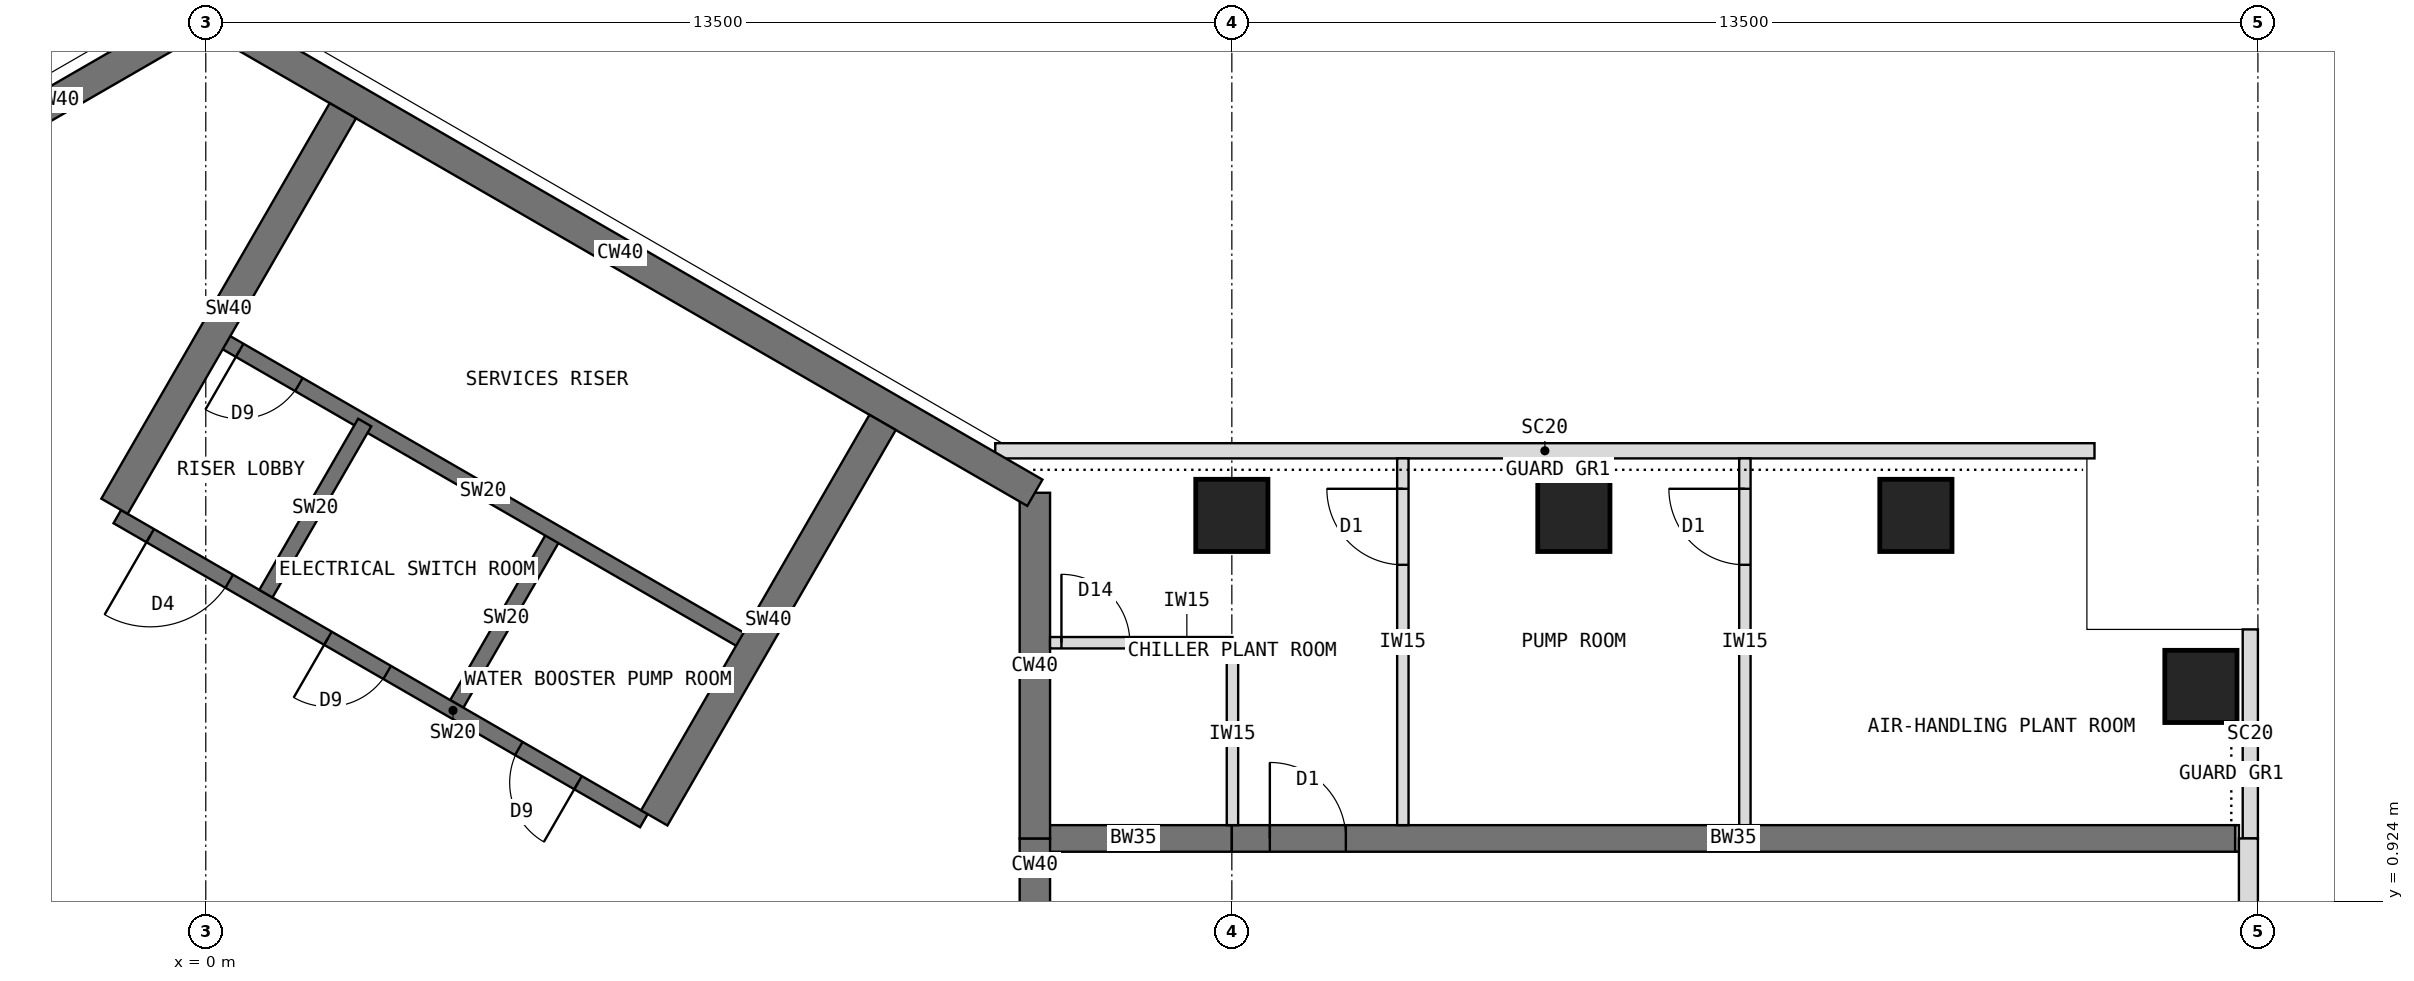
"""IFC4 building model, lengths in metres.
Left out: names, types, materials, properties, quantities, classifications, styles, units other than length and angle.
Written with IfcOpenShell. Run it as: python <this file> out.ifc"""

import sys

from ifc_helpers import new_model, si_unit, direction, frame, frame_2d, origin, origin_2d, place, context, subcontext, project, spatial, rectangle, extrude, element, fill, save


model = new_model("IFC4")
c1 = context("Model", 3, precision=1e-05, world=origin(), true_north=direction((0.0, 1.0)))
c2 = subcontext(c1, "Body", "Model", "MODEL_VIEW")
j1 = project(units=[si_unit("LENGTHUNIT", "METRE"), si_unit("PLANEANGLEUNIT", "RADIAN")], contexts=[c1])
p1 = place(None, origin())
s1 = spatial("IfcSite", under=j1, at=p1, CompositionType="ELEMENT")
p2 = place(p1, origin())
s2 = spatial("IfcBuilding", under=s1, at=p2, CompositionType="ELEMENT")
p3 = place(p2, frame((0.0, 0.0, 291.5)))
s3 = spatial("IfcBuildingStorey", under=s2, at=p3, CompositionType="ELEMENT", Elevation=291.5)
p4 = place(p3, frame((10.908, -1.75, 0.0), z_axis=(0.0, 0.0, 1.0), x_axis=(0.0, 1.0, 0.0)))
e1 = element("IfcWall", 1, at=p4, inside=s3, PredefinedType="SHEAR", context=c2, shape_type="SweptSolid", body=[
    extrude(rectangle(XDim=3.5, YDim=0.4, at=frame_2d((1.75, 0.0))), origin(), (0.0, 0.0, 1.0), 4.55),
])
p5 = place(p4, frame((0.85, 0.0, 0.0)))
e2 = element("IfcOpeningElement", 2, at=p5, cuts=e1, PredefinedType="OPENING", context=c2, shape_type="SweptSolid", body=[
    extrude(rectangle(XDim=1.8, YDim=2.1, at=frame_2d((0.9, 1.05))), frame((0.0, 0.21, 0.0), z_axis=(0.0, -1.0, 0.0), x_axis=(1.0, 0.0, 0.0)), (0.0, 0.0, 1.0), 0.42),
])
p6 = place(p3, frame((10.908, 1.75, 0.0), z_axis=(0.0, 0.0, 1.0), x_axis=(0.0, 1.0, 0.0)))
e3 = element("IfcWall", 3, at=p6, inside=s3, PredefinedType="SHEAR", context=c2, shape_type="SweptSolid", body=[
    extrude(rectangle(XDim=4.548, YDim=0.4, at=frame_2d((2.274, 0.0))), origin(), (0.0, 0.0, 1.0), 4.55),
])
p7 = place(p3, frame((10.908, 6.298, 0.0), z_axis=(0.0, 0.0, 1.0), x_axis=(-0.866021940709, 0.500005998175, 0.0)))
e4 = element("IfcWall", 4, at=p7, inside=s3, PredefinedType="SHEAR", context=c2, shape_type="SweptSolid", body=[
    extrude(rectangle(XDim=12.596, YDim=0.4, at=frame_2d((6.298, 0.0))), origin(), (0.0, 0.0, 1.0), 4.55),
])
p8 = place(p3, frame((0.0, 12.596, 0.0), z_axis=(0.0, 0.0, 1.0), x_axis=(-0.866011268655, -0.500024481964, 0.0)))
e5 = element("IfcWall", 5, at=p8, inside=s3, PredefinedType="SHEAR", context=c2, shape_type="SweptSolid", body=[
    extrude(rectangle(XDim=4.548, YDim=0.4, at=frame_2d((2.274, 0.0))), origin(), (0.0, 0.0, 1.0), 4.55),
])
p9 = place(p3, frame((10.908, 1.75, 0.0), z_axis=(0.0, 0.0, 1.0), x_axis=(1.0, 0.0, 0.0)))
e6 = element("IfcWall", 6, at=p9, inside=s3, PredefinedType="SHEAR", context=c2, shape_type="SweptSolid", body=[
    extrude(rectangle(XDim=2.592, YDim=0.35, at=frame_2d((1.296, 0.0))), origin(), (0.0, 0.0, 1.0), 4.55),
])
p10 = place(p3, frame((13.5, 1.75, 0.0), z_axis=(0.0, 0.0, 1.0), x_axis=(1.0, 0.0, 0.0)))
e7 = element("IfcWall", 7, at=p10, inside=s3, PredefinedType="SHEAR", context=c2, shape_type="SweptSolid", body=[
    extrude(rectangle(XDim=13.2, YDim=0.35, at=frame_2d((6.6, 0.0))), origin(), (0.0, 0.0, 1.0), 4.55),
])
p11 = place(p10, frame((0.5, 0.0, 0.0)))
e8 = element("IfcOpeningElement", 8, at=p11, cuts=e7, PredefinedType="OPENING", context=c2, shape_type="SweptSolid", body=[
    extrude(rectangle(XDim=1.0, YDim=2.1, at=frame_2d((0.5, 1.05))), frame((0.0, 0.185, 0.0), z_axis=(0.0, -1.0, 0.0), x_axis=(1.0, 0.0, 0.0)), (0.0, 0.0, 1.0), 0.37),
])
for number, where, z_axis, x_axis in (
    (9, (13.5, 6.0, 0.0), (0.0, 0.0, 1.0), (1.0, 0.0, 0.0)),
    (10, (18.0, 6.0, 0.0), (0.0, 0.0, 1.0), (1.0, 0.0, 0.0)),
    (11, (22.5, 6.0, 0.0), (0.0, 0.0, 1.0), (1.0, 0.0, 0.0)),
    (12, (26.25, 3.75, 0.0), (0.0, 0.0, 1.0), (1.0, 0.0, 0.0)),
):
    element("IfcColumn", number, at=place(p3, frame(where, z_axis=z_axis, x_axis=x_axis)), inside=s3, PredefinedType="COLUMN", context=c2, shape_type="SweptSolid", body=[
        extrude(rectangle(XDim=0.95, YDim=0.95, at=origin_2d()), origin(), (0.0, 0.0, 1.0), 5.0),
    ])
p12 = place(p3, frame((10.387, 6.85, 0.0), z_axis=(0.0, 0.0, 1.0), x_axis=(1.0, 0.0, 0.0)))
e13 = element("IfcWall", 13, at=p12, inside=s3, PredefinedType="USERDEFINED", context=c2, shape_type="SweptSolid", body=[
    extrude(rectangle(XDim=14.463, YDim=0.2, at=frame_2d((7.231, 0.0))), origin(), (0.0, 0.0, 1.0), 4.55),
])
p13 = place(p3, frame((26.875, -1.75, 0.0), z_axis=(0.0, 0.0, 1.0), x_axis=(0.0, 1.0, 0.0)))
e14 = element("IfcWall", 14, at=p13, inside=s3, PredefinedType="STANDARD", context=c2, shape_type="SweptSolid", body=[
    extrude(rectangle(XDim=3.5, YDim=0.25, at=frame_2d((1.75, 0.0))), origin(), (0.0, 0.0, 1.0), 4.55),
])
p14 = place(p3, frame((26.9, 1.75, 0.0), z_axis=(0.0, 0.0, 1.0), x_axis=(0.0, 1.0, 0.0)))
e15 = element("IfcWall", 15, at=p14, inside=s3, PredefinedType="USERDEFINED", context=c2, shape_type="SweptSolid", body=[
    extrude(rectangle(XDim=2.75, YDim=0.2, at=frame_2d((1.375, 0.0))), origin(), (0.0, 0.0, 1.0), 4.55),
])
p15 = place(p3, frame((26.7, 1.75, 0.0), z_axis=(0.0, 0.0, 1.0), x_axis=(1.0, 0.0, 0.0)))
e16 = element("IfcWall", 16, at=p15, inside=s3, PredefinedType="PARTITIONING", context=c2, shape_type="SweptSolid", body=[
    extrude(rectangle(XDim=0.05, YDim=0.35, at=frame_2d((0.025, 0.0))), origin(), (0.0, 0.0, 1.0), 4.55),
])
p16 = place(p3, frame((5.764, 1.984, 0.0), z_axis=(0.0, 0.0, 1.0), x_axis=(-0.866026010844, 0.49999894854, 0.0)))
e17 = element("IfcWall", 17, at=p16, inside=s3, PredefinedType="SHEAR", context=c2, shape_type="SweptSolid", body=[
    extrude(rectangle(XDim=8.0, YDim=0.2, at=frame_2d((4.0, 0.0))), origin(), (0.0, 0.0, 1.0), 4.55),
])
p17 = place(p16, frame((6.3, 0.0, 0.0)))
e18 = element("IfcOpeningElement", 18, at=p17, cuts=e17, PredefinedType="OPENING", context=c2, shape_type="SweptSolid", body=[
    extrude(rectangle(XDim=1.2, YDim=2.1, at=frame_2d((0.6, 1.05))), frame((0.0, 0.11, 0.0), z_axis=(0.0, -1.0, 0.0), x_axis=(1.0, 0.0, 0.0)), (0.0, 0.0, 1.0), 0.22),
])
p18 = place(p16, frame((1.0, 0.0, 0.0)))
e19 = element("IfcOpeningElement", 19, at=p18, cuts=e17, PredefinedType="OPENING", context=c2, shape_type="SweptSolid", body=[
    extrude(rectangle(XDim=0.9, YDim=2.1, at=frame_2d((0.45, 1.05))), frame((0.0, 0.11, 0.0), z_axis=(0.0, -1.0, 0.0), x_axis=(1.0, 0.0, 0.0)), (0.0, 0.0, 1.0), 0.22),
])
p19 = place(p16, frame((3.9, 0.0, 0.0)))
e20 = element("IfcOpeningElement", 20, at=p19, cuts=e17, PredefinedType="OPENING", context=c2, shape_type="SweptSolid", body=[
    extrude(rectangle(XDim=0.9, YDim=2.1, at=frame_2d((0.45, 1.05))), frame((0.0, 0.11, 0.0), z_axis=(0.0, -1.0, 0.0), x_axis=(1.0, 0.0, 0.0)), (0.0, 0.0, 1.0), 0.22),
])
for number, where, z_axis, x_axis in (
    (21, (3.303, 3.52, 0.0), (0.0, 0.0, 1.0), (0.5, 0.866, 0.0)),
    (22, (0.791, 4.97, 0.0), (0.0, 0.0, 1.0), (0.5, 0.866, 0.0)),
):
    element("IfcWall", number, at=place(p3, frame(where, z_axis=z_axis, x_axis=x_axis)), inside=s3, PredefinedType="SHEAR", context=c2, shape_type="SweptSolid", body=[
        extrude(rectangle(XDim=2.6, YDim=0.2, at=frame_2d((1.3, 0.0))), origin(), (0.0, 0.0, 1.0), 4.55),
    ])
p20 = place(p3, frame((7.114, 4.322, 0.0), z_axis=(0.0, 0.0, 1.0), x_axis=(-0.866026010844, 0.49999894854, 0.0)))
e23 = element("IfcWall", 23, at=p20, inside=s3, PredefinedType="SHEAR", context=c2, shape_type="SweptSolid", body=[
    extrude(rectangle(XDim=8.0, YDim=0.2, at=frame_2d((4.0, 0.0))), origin(), (0.0, 0.0, 1.0), 4.55),
])
p21 = place(p20, frame((6.8, 0.0, 0.0)))
e24 = element("IfcOpeningElement", 24, at=p21, cuts=e23, PredefinedType="OPENING", context=c2, shape_type="SweptSolid", body=[
    extrude(rectangle(XDim=0.9, YDim=2.1, at=frame_2d((0.45, 1.05))), frame((0.0, 0.11, 0.0), z_axis=(0.0, -1.0, 0.0), x_axis=(1.0, 0.0, 0.0)), (0.0, 0.0, 1.0), 0.22),
])
for number, where, z_axis, x_axis in (
    (25, (-1.201, 6.12, 0.0), (0.0, 0.0, 1.0), (0.5, 0.866, 0.0)),
    (26, (5.901, 2.02, 0.0), (0.0, 0.0, 1.0), (0.5, 0.866, 0.0)),
):
    element("IfcWall", number, at=place(p3, frame(where, z_axis=z_axis, x_axis=x_axis)), inside=s3, PredefinedType="SHEAR", context=c2, shape_type="SweptSolid", body=[
        extrude(rectangle(XDim=6.008, YDim=0.4, at=frame_2d((3.004, 0.0))), origin(), (0.0, 0.0, 1.0), 4.55),
    ])
p22 = place(p3, frame((15.75, 1.925, 0.0), z_axis=(0.0, 0.0, 1.0), x_axis=(0.0, 1.0, 0.0)))
e27 = element("IfcWall", 27, at=p22, inside=s3, PredefinedType="PARTITIONING", context=c2, shape_type="SweptSolid", body=[
    extrude(rectangle(XDim=4.825, YDim=0.15, at=frame_2d((2.413, 0.0))), origin(), (0.0, 0.0, 1.0), 4.55),
])
p23 = place(p22, frame((3.425, 0.0, 0.0)))
e28 = element("IfcOpeningElement", 28, at=p23, cuts=e27, PredefinedType="OPENING", context=c2, shape_type="SweptSolid", body=[
    extrude(rectangle(XDim=1.0, YDim=2.1, at=frame_2d((0.5, 1.05))), frame((0.0, 0.085, 0.0), z_axis=(0.0, -1.0, 0.0), x_axis=(1.0, 0.0, 0.0)), (0.0, 0.0, 1.0), 0.17),
])
p24 = place(p3, frame((20.25, 1.925, 0.0), z_axis=(0.0, 0.0, 1.0), x_axis=(0.0, 1.0, 0.0)))
e29 = element("IfcWall", 29, at=p24, inside=s3, PredefinedType="PARTITIONING", context=c2, shape_type="SweptSolid", body=[
    extrude(rectangle(XDim=4.825, YDim=0.15, at=frame_2d((2.413, 0.0))), origin(), (0.0, 0.0, 1.0), 4.55),
])
p25 = place(p24, frame((3.425, 0.0, 0.0)))
e30 = element("IfcOpeningElement", 30, at=p25, cuts=e29, PredefinedType="OPENING", context=c2, shape_type="SweptSolid", body=[
    extrude(rectangle(XDim=1.0, YDim=2.1, at=frame_2d((0.5, 1.05))), frame((0.0, 0.085, 0.0), z_axis=(0.0, -1.0, 0.0), x_axis=(1.0, 0.0, 0.0)), (0.0, 0.0, 1.0), 0.17),
])
p26 = place(p3, frame((11.108, 4.325, 0.0), z_axis=(0.0, 0.0, 1.0), x_axis=(1.0, 0.0, 0.0)))
e31 = element("IfcWall", 31, at=p26, inside=s3, PredefinedType="PARTITIONING", context=c2, shape_type="SweptSolid", body=[
    extrude(rectangle(XDim=2.4, YDim=0.15, at=frame_2d((1.2, 0.0))), origin(), (0.0, 0.0, 1.0), 4.55),
])
p27 = place(p26, frame((0.15, 0.0, 0.0)))
e32 = element("IfcOpeningElement", 32, at=p27, cuts=e31, PredefinedType="OPENING", context=c2, shape_type="SweptSolid", body=[
    extrude(rectangle(XDim=0.9, YDim=2.1, at=frame_2d((0.45, 1.05))), frame((0.0, 0.085, 0.0), z_axis=(0.0, -1.0, 0.0), x_axis=(1.0, 0.0, 0.0)), (0.0, 0.0, 1.0), 0.17),
])
p28 = place(p3, frame((13.508, 1.925, 0.0), z_axis=(0.0, 0.0, 1.0), x_axis=(0.0, 1.0, 0.0)))
e33 = element("IfcWall", 33, at=p28, inside=s3, PredefinedType="PARTITIONING", context=c2, shape_type="SweptSolid", body=[
    extrude(rectangle(XDim=2.4, YDim=0.15, at=frame_2d((1.2, 0.0))), origin(), (0.0, 0.0, 1.0), 4.017),
])
p29 = place(p17, origin())
e34 = element("IfcDoor", 34, at=p29, inside=s3, OperationType="SINGLE_SWING_RIGHT", PredefinedType="DOOR", context=c2, shape_type="SweptSolid", body=[
    extrude(rectangle(XDim=1.2, YDim=2.1, at=frame_2d((0.6, 1.05))), frame((0.0, 0.025, 0.0), z_axis=(0.0, -1.0, 0.0), x_axis=(1.0, 0.0, 0.0)), (0.0, 0.0, 1.0), 0.05),
])
fill(e18, e34)
p30 = place(p21, origin())
e35 = element("IfcDoor", 35, at=p30, inside=s3, OperationType="SINGLE_SWING_RIGHT", PredefinedType="DOOR", context=c2, shape_type="SweptSolid", body=[
    extrude(rectangle(XDim=0.9, YDim=2.1, at=frame_2d((0.45, 1.05))), frame((0.0, 0.025, 0.0), z_axis=(0.0, -1.0, 0.0), x_axis=(1.0, 0.0, 0.0)), (0.0, 0.0, 1.0), 0.05),
])
fill(e24, e35)
p31 = place(p23, origin())
e36 = element("IfcDoor", 36, at=p31, inside=s3, OperationType="SINGLE_SWING_RIGHT", PredefinedType="DOOR", context=c2, shape_type="SweptSolid", body=[
    extrude(rectangle(XDim=1.0, YDim=2.1, at=frame_2d((0.5, 1.05))), frame((0.0, 0.025, 0.0), z_axis=(0.0, -1.0, 0.0), x_axis=(1.0, 0.0, 0.0)), (0.0, 0.0, 1.0), 0.05),
])
fill(e28, e36)
p32 = place(p25, origin())
e37 = element("IfcDoor", 37, at=p32, inside=s3, OperationType="SINGLE_SWING_RIGHT", PredefinedType="DOOR", context=c2, shape_type="SweptSolid", body=[
    extrude(rectangle(XDim=1.0, YDim=2.1, at=frame_2d((0.5, 1.05))), frame((0.0, 0.025, 0.0), z_axis=(0.0, -1.0, 0.0), x_axis=(1.0, 0.0, 0.0)), (0.0, 0.0, 1.0), 0.05),
])
fill(e30, e37)
p33 = place(p27, origin())
e38 = element("IfcDoor", 38, at=p33, inside=s3, OperationType="SINGLE_SWING_LEFT", PredefinedType="DOOR", context=c2, shape_type="SweptSolid", body=[
    extrude(rectangle(XDim=0.9, YDim=2.1, at=frame_2d((0.45, 1.05))), frame((0.0, 0.025, 0.0), z_axis=(0.0, -1.0, 0.0), x_axis=(1.0, 0.0, 0.0)), (0.0, 0.0, 1.0), 0.05),
])
fill(e32, e38)
p34 = place(p11, origin())
e39 = element("IfcDoor", 39, at=p34, inside=s3, OperationType="SINGLE_SWING_LEFT", PredefinedType="DOOR", context=c2, shape_type="SweptSolid", body=[
    extrude(rectangle(XDim=1.0, YDim=2.1, at=frame_2d((0.5, 1.05))), frame((0.0, 0.025, 0.0), z_axis=(0.0, -1.0, 0.0), x_axis=(1.0, 0.0, 0.0)), (0.0, 0.0, 1.0), 0.05),
])
fill(e8, e39)
p35 = place(p18, origin())
e40 = element("IfcDoor", 40, at=p35, inside=s3, OperationType="SINGLE_SWING_LEFT", PredefinedType="DOOR", context=c2, shape_type="SweptSolid", body=[
    extrude(rectangle(XDim=0.9, YDim=2.1, at=frame_2d((0.45, 1.05))), frame((0.0, 0.025, 0.0), z_axis=(0.0, -1.0, 0.0), x_axis=(1.0, 0.0, 0.0)), (0.0, 0.0, 1.0), 0.05),
])
fill(e19, e40)
p36 = place(p19, origin())
e41 = element("IfcDoor", 41, at=p36, inside=s3, OperationType="SINGLE_SWING_RIGHT", PredefinedType="DOOR", context=c2, shape_type="SweptSolid", body=[
    extrude(rectangle(XDim=0.9, YDim=2.1, at=frame_2d((0.45, 1.05))), frame((0.0, 0.025, 0.0), z_axis=(0.0, -1.0, 0.0), x_axis=(1.0, 0.0, 0.0)), (0.0, 0.0, 1.0), 0.05),
])
fill(e20, e41)
save(model, sys.argv[1])
